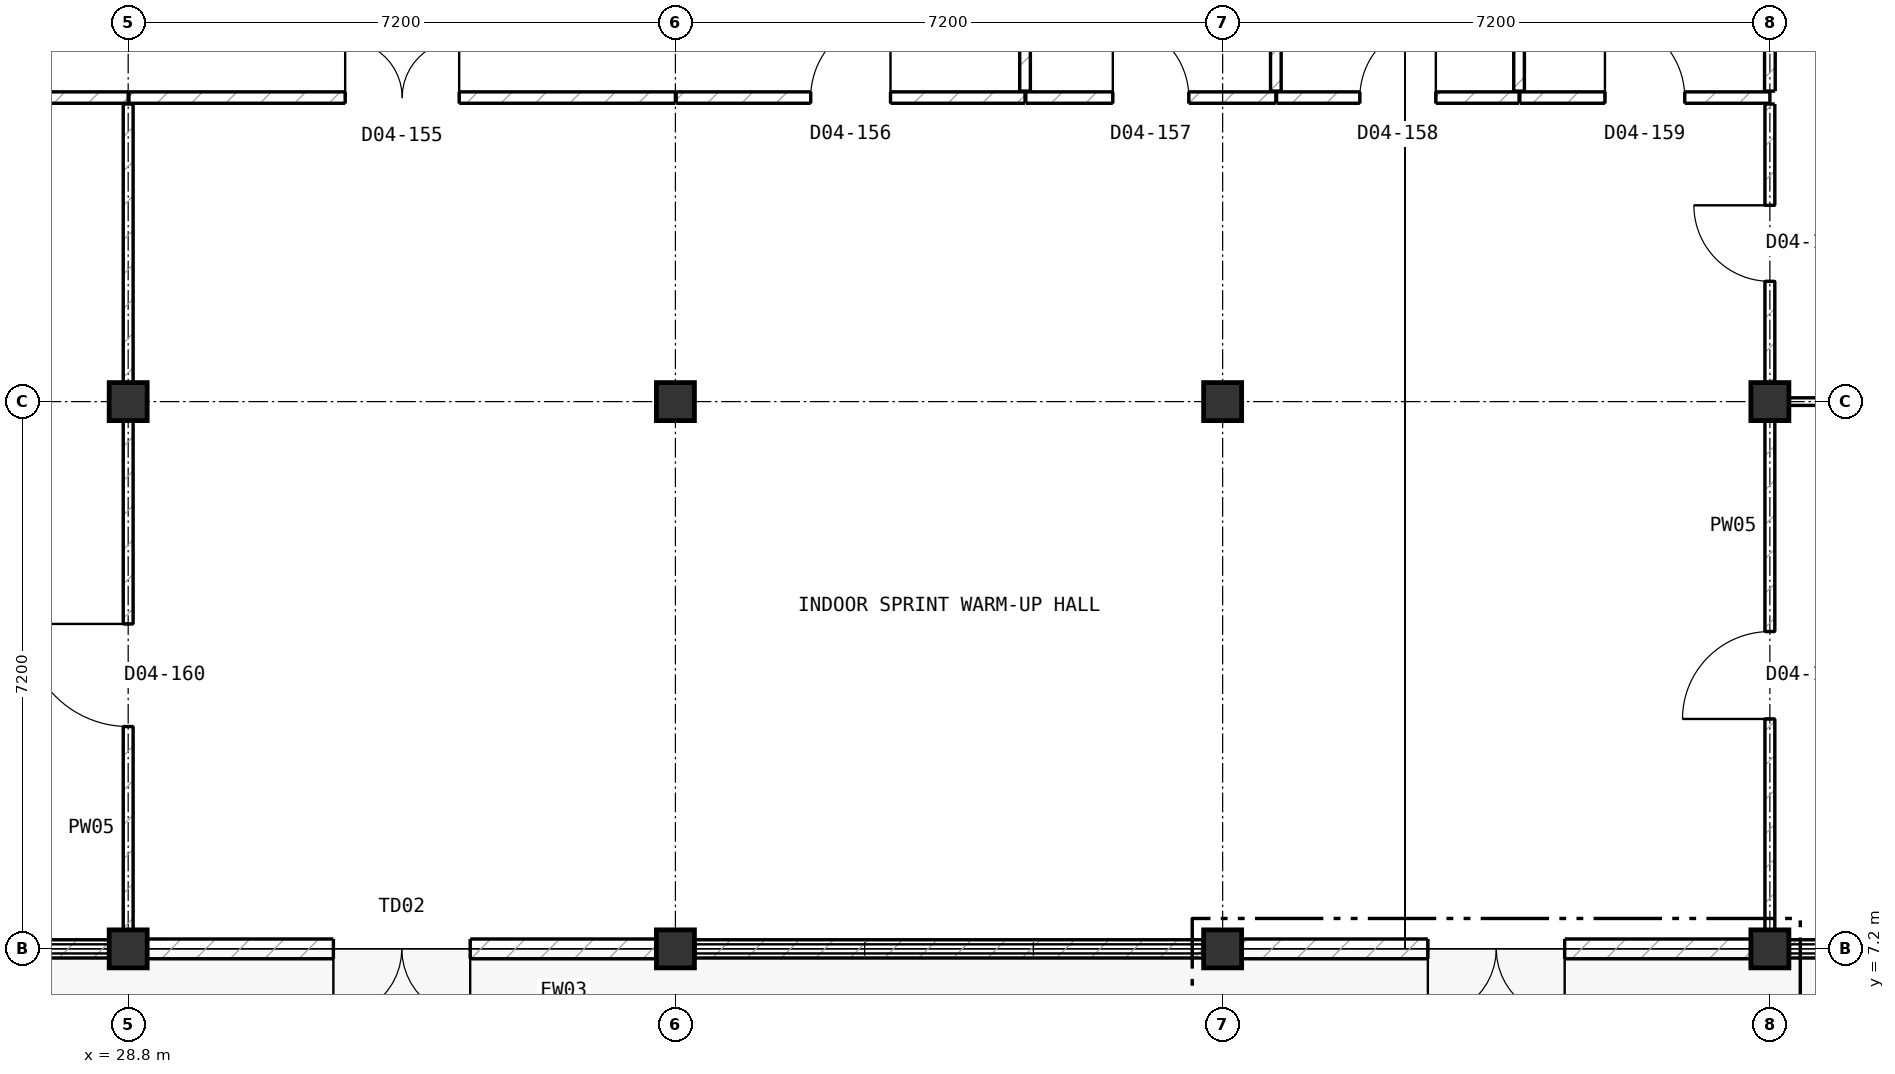
"""IFC4 building model, lengths in metres.
Left out: names, types, materials, properties, quantities, classifications, styles, units other than length and angle.
Written with IfcOpenShell. Run it as: python <this file> out.ifc"""

import sys

from ifc_helpers import new_model, si_unit, direction, frame, frame_2d, origin, origin_2d, place, context, subcontext, project, spatial, rectangle, extrude, element, fill, save


model = new_model("IFC4")
c1 = context("Model", 3, precision=1e-05, world=origin(), true_north=direction((0.0, 1.0)))
c2 = subcontext(c1, "Body", "Model", "MODEL_VIEW")
j1 = project(units=[si_unit("LENGTHUNIT", "METRE"), si_unit("PLANEANGLEUNIT", "RADIAN")], contexts=[c1])
p1 = place(None, origin())
s1 = spatial("IfcSite", under=j1, at=p1, CompositionType="ELEMENT")
p2 = place(p1, origin())
s2 = spatial("IfcBuilding", under=s1, at=p2, CompositionType="ELEMENT")
p3 = place(p2, frame((0.0, 0.0, 20.4)))
s3 = spatial("IfcBuildingStorey", under=s2, at=p3, CompositionType="ELEMENT", Elevation=20.4)
for number, where, z_axis, x_axis in (
    (1, (28.8, 7.2, 0.0), (0.0, 0.0, 1.0), (1.0, 0.0, 0.0)),
    (2, (28.8, 14.4, 0.0), (0.0, 0.0, 1.0), (1.0, 0.0, 0.0)),
    (3, (36.0, 7.2, 0.0), (0.0, 0.0, 1.0), (1.0, 0.0, 0.0)),
    (4, (36.0, 14.4, 0.0), (0.0, 0.0, 1.0), (1.0, 0.0, 0.0)),
    (5, (43.2, 7.2, 0.0), (0.0, 0.0, 1.0), (1.0, 0.0, 0.0)),
    (6, (43.2, 14.4, 0.0), (0.0, 0.0, 1.0), (1.0, 0.0, 0.0)),
    (7, (50.4, 7.2, 0.0), (0.0, 0.0, 1.0), (1.0, 0.0, 0.0)),
    (8, (50.4, 14.4, 0.0), (0.0, 0.0, 1.0), (1.0, 0.0, 0.0)),
):
    element("IfcColumn", number, at=place(p3, frame(where, z_axis=z_axis, x_axis=x_axis)), inside=s3, PredefinedType="COLUMN", context=c2, shape_type="SweptSolid", body=[
        extrude(rectangle(XDim=0.5, YDim=0.5, at=origin_2d()), origin(), (0.0, 0.0, 1.0), 4.4),
    ])
p4 = place(p3, frame((57.365, 7.2, 0.0), z_axis=(0.0, 0.0, 1.0), x_axis=(-1.0, 0.0, 0.0)))
e9 = element("IfcWall", 9, at=p4, inside=s3, PredefinedType="SOLIDWALL", context=c2, shape_type="SweptSolid", body=[
    extrude(rectangle(XDim=6.73, YDim=0.24, at=frame_2d((3.365, 0.0))), origin(), (0.0, 0.0, 1.0), 0.3),
])
p5 = place(p3, frame((50.165, 7.2, 0.0), z_axis=(0.0, 0.0, 1.0), x_axis=(-1.0, 0.0, 0.0)))
e10 = element("IfcWall", 10, at=p5, inside=s3, PredefinedType="SOLIDWALL", context=c2, shape_type="SweptSolid", body=[
    extrude(rectangle(XDim=6.73, YDim=0.26, at=frame_2d((3.365, 0.0))), origin(), (0.0, 0.0, 1.0), 3.655),
])
p6 = place(p5, frame((2.465, 0.0, 0.0)))
e11 = element("IfcOpeningElement", 11, at=p6, cuts=e10, PredefinedType="OPENING", context=c2, shape_type="SweptSolid", body=[
    extrude(rectangle(XDim=1.8, YDim=2.3, at=frame_2d((0.9, 1.15))), frame((0.0, 0.14, 0.0), z_axis=(0.0, -1.0, 0.0), x_axis=(1.0, 0.0, 0.0)), (0.0, 0.0, 1.0), 0.28),
])
p7 = place(p3, frame((42.965, 7.2, 0.0), z_axis=(0.0, 0.0, 1.0), x_axis=(-1.0, 0.0, 0.0)))
e12 = element("IfcWall", 12, at=p7, inside=s3, PredefinedType="SOLIDWALL", context=c2, shape_type="SweptSolid", body=[
    extrude(rectangle(XDim=6.73, YDim=0.24, at=frame_2d((3.365, 0.0))), origin(), (0.0, 0.0, 1.0), 0.3),
])
p8 = place(p3, frame((35.765, 7.2, 0.0), z_axis=(0.0, 0.0, 1.0), x_axis=(-1.0, 0.0, 0.0)))
e13 = element("IfcWall", 13, at=p8, inside=s3, PredefinedType="SOLIDWALL", context=c2, shape_type="SweptSolid", body=[
    extrude(rectangle(XDim=6.73, YDim=0.26, at=frame_2d((3.365, 0.0))), origin(), (0.0, 0.0, 1.0), 3.655),
])
p9 = place(p8, frame((2.465, 0.0, 0.0)))
e14 = element("IfcOpeningElement", 14, at=p9, cuts=e13, PredefinedType="OPENING", context=c2, shape_type="SweptSolid", body=[
    extrude(rectangle(XDim=1.8, YDim=2.3, at=frame_2d((0.9, 1.15))), frame((0.0, 0.14, 0.0), z_axis=(0.0, -1.0, 0.0), x_axis=(1.0, 0.0, 0.0)), (0.0, 0.0, 1.0), 0.28),
])
p10 = place(p3, frame((28.565, 7.2, 0.0), z_axis=(0.0, 0.0, 1.0), x_axis=(-1.0, 0.0, 0.0)))
e15 = element("IfcWall", 15, at=p10, inside=s3, PredefinedType="SOLIDWALL", context=c2, shape_type="SweptSolid", body=[
    extrude(rectangle(XDim=6.73, YDim=0.24, at=frame_2d((3.365, 0.0))), origin(), (0.0, 0.0, 1.0), 0.3),
])
p11 = place(p3, frame((21.61, 18.4, 0.0), z_axis=(0.0, 0.0, 1.0), x_axis=(1.0, 0.0, 0.0)))
e16 = element("IfcWall", 16, at=p11, inside=s3, PredefinedType="PARTITIONING", context=c2, shape_type="SweptSolid", body=[
    extrude(rectangle(XDim=7.19, YDim=0.15, at=frame_2d((3.595, 0.0))), origin(), (0.0, 0.0, 1.0), 4.12),
])
p12 = place(p3, frame((28.81, 18.4, 0.0), z_axis=(0.0, 0.0, 1.0), x_axis=(1.0, 0.0, 0.0)))
e17 = element("IfcWall", 17, at=p12, inside=s3, PredefinedType="PARTITIONING", context=c2, shape_type="SweptSolid", body=[
    extrude(rectangle(XDim=7.19, YDim=0.15, at=frame_2d((3.595, 0.0))), origin(), (0.0, 0.0, 1.0), 4.12),
])
p13 = place(p12, frame((2.845, 0.0, 0.0)))
e18 = element("IfcOpeningElement", 18, at=p13, cuts=e17, PredefinedType="OPENING", context=c2, shape_type="SweptSolid", body=[
    extrude(rectangle(XDim=1.5, YDim=2.2, at=frame_2d((0.75, 1.1))), frame((0.0, 0.085, 0.0), z_axis=(0.0, -1.0, 0.0), x_axis=(1.0, 0.0, 0.0)), (0.0, 0.0, 1.0), 0.17),
])
p14 = place(p3, frame((36.01, 18.4, 0.0), z_axis=(0.0, 0.0, 1.0), x_axis=(1.0, 0.0, 0.0)))
e19 = element("IfcWall", 19, at=p14, inside=s3, PredefinedType="PARTITIONING", context=c2, shape_type="SweptSolid", body=[
    extrude(rectangle(XDim=4.59, YDim=0.15, at=frame_2d((2.295, 0.0))), origin(), (0.0, 0.0, 1.0), 4.12),
])
p15 = place(p14, frame((1.77, 0.0, 0.0)))
e20 = element("IfcOpeningElement", 20, at=p15, cuts=e19, PredefinedType="OPENING", context=c2, shape_type="SweptSolid", body=[
    extrude(rectangle(XDim=1.05, YDim=2.15, at=frame_2d((0.525, 1.075))), frame((0.0, 0.085, 0.0), z_axis=(0.0, -1.0, 0.0), x_axis=(1.0, 0.0, 0.0)), (0.0, 0.0, 1.0), 0.17),
])
p16 = place(p3, frame((40.61, 18.4, 0.0), z_axis=(0.0, 0.0, 1.0), x_axis=(1.0, 0.0, 0.0)))
e21 = element("IfcWall", 21, at=p16, inside=s3, PredefinedType="PARTITIONING", context=c2, shape_type="SweptSolid", body=[
    extrude(rectangle(XDim=3.29, YDim=0.15, at=frame_2d((1.645, 0.0))), origin(), (0.0, 0.0, 1.0), 4.12),
])
p17 = place(p16, frame((1.145, 0.0, 0.0)))
e22 = element("IfcOpeningElement", 22, at=p17, cuts=e21, PredefinedType="OPENING", context=c2, shape_type="SweptSolid", body=[
    extrude(rectangle(XDim=1.0, YDim=2.15, at=frame_2d((0.5, 1.075))), frame((0.0, 0.085, 0.0), z_axis=(0.0, -1.0, 0.0), x_axis=(1.0, 0.0, 0.0)), (0.0, 0.0, 1.0), 0.17),
])
p18 = place(p3, frame((43.91, 18.4, 0.0), z_axis=(0.0, 0.0, 1.0), x_axis=(1.0, 0.0, 0.0)))
e23 = element("IfcWall", 23, at=p18, inside=s3, PredefinedType="PARTITIONING", context=c2, shape_type="SweptSolid", body=[
    extrude(rectangle(XDim=3.19, YDim=0.15, at=frame_2d((1.595, 0.0))), origin(), (0.0, 0.0, 1.0), 4.12),
])
p19 = place(p18, frame((1.095, 0.0, 0.0)))
e24 = element("IfcOpeningElement", 24, at=p19, cuts=e23, PredefinedType="OPENING", context=c2, shape_type="SweptSolid", body=[
    extrude(rectangle(XDim=1.0, YDim=2.15, at=frame_2d((0.5, 1.075))), frame((0.0, 0.085, 0.0), z_axis=(0.0, -1.0, 0.0), x_axis=(1.0, 0.0, 0.0)), (0.0, 0.0, 1.0), 0.17),
])
p20 = place(p3, frame((47.11, 18.4, 0.0), z_axis=(0.0, 0.0, 1.0), x_axis=(1.0, 0.0, 0.0)))
e25 = element("IfcWall", 25, at=p20, inside=s3, PredefinedType="PARTITIONING", context=c2, shape_type="SweptSolid", body=[
    extrude(rectangle(XDim=3.29, YDim=0.15, at=frame_2d((1.645, 0.0))), origin(), (0.0, 0.0, 1.0), 4.12),
])
p21 = place(p20, frame((1.12, 0.0, 0.0)))
e26 = element("IfcOpeningElement", 26, at=p21, cuts=e25, PredefinedType="OPENING", context=c2, shape_type="SweptSolid", body=[
    extrude(rectangle(XDim=1.05, YDim=2.15, at=frame_2d((0.525, 1.075))), frame((0.0, 0.085, 0.0), z_axis=(0.0, -1.0, 0.0), x_axis=(1.0, 0.0, 0.0)), (0.0, 0.0, 1.0), 0.17),
])
p22 = place(p3, frame((40.6, 18.485, 0.0), z_axis=(0.0, 0.0, 1.0), x_axis=(0.0, 1.0, 0.0)))
e27 = element("IfcWall", 27, at=p22, inside=s3, PredefinedType="PARTITIONING", context=c2, shape_type="SweptSolid", body=[
    extrude(rectangle(XDim=2.975, YDim=0.14, at=frame_2d((1.487, 0.0))), origin(), (0.0, 0.0, 1.0), 4.12),
])
p23 = place(p3, frame((43.9, 18.485, 0.0), z_axis=(0.0, 0.0, 1.0), x_axis=(0.0, 1.0, 0.0)))
e28 = element("IfcWall", 28, at=p23, inside=s3, PredefinedType="PARTITIONING", context=c2, shape_type="SweptSolid", body=[
    extrude(rectangle(XDim=2.915, YDim=0.14, at=frame_2d((1.458, 0.0))), origin(), (0.0, 0.0, 1.0), 4.12),
])
p24 = place(p3, frame((47.1, 18.485, 0.0), z_axis=(0.0, 0.0, 1.0), x_axis=(0.0, 1.0, 0.0)))
e29 = element("IfcWall", 29, at=p24, inside=s3, PredefinedType="PARTITIONING", context=c2, shape_type="SweptSolid", body=[
    extrude(rectangle(XDim=2.975, YDim=0.14, at=frame_2d((1.487, 0.0))), origin(), (0.0, 0.0, 1.0), 4.12),
])
p25 = place(p3, frame((50.4, 18.485, 0.0), z_axis=(0.0, 0.0, 1.0), x_axis=(0.0, 1.0, 0.0)))
e30 = element("IfcWall", 30, at=p25, inside=s3, PredefinedType="PARTITIONING", context=c2, shape_type="SweptSolid", body=[
    extrude(rectangle(XDim=2.865, YDim=0.14, at=frame_2d((1.433, 0.0))), origin(), (0.0, 0.0, 1.0), 3.65),
])
p26 = place(p3, frame((28.8, 7.45, 0.0), z_axis=(0.0, 0.0, 1.0), x_axis=(0.0, 1.0, 0.0)))
e31 = element("IfcWall", 31, at=p26, inside=s3, PredefinedType="PARTITIONING", context=c2, shape_type="SweptSolid", body=[
    extrude(rectangle(XDim=6.7, YDim=0.13, at=frame_2d((3.35, 0.0))), origin(), (0.0, 0.0, 1.0), 3.65),
])
p27 = place(p26, frame((2.675, 0.0, 0.0)))
e32 = element("IfcOpeningElement", 32, at=p27, cuts=e31, PredefinedType="OPENING", context=c2, shape_type="SweptSolid", body=[
    extrude(rectangle(XDim=1.35, YDim=2.15, at=frame_2d((0.675, 1.075))), frame((0.0, 0.075, 0.0), z_axis=(0.0, -1.0, 0.0), x_axis=(1.0, 0.0, 0.0)), (0.0, 0.0, 1.0), 0.15),
])
p28 = place(p3, frame((28.8, 14.65, 0.0), z_axis=(0.0, 0.0, 1.0), x_axis=(0.0, 1.0, 0.0)))
e33 = element("IfcWall", 33, at=p28, inside=s3, PredefinedType="PARTITIONING", context=c2, shape_type="SweptSolid", body=[
    extrude(rectangle(XDim=3.665, YDim=0.13, at=frame_2d((1.833, 0.0))), origin(), (0.0, 0.0, 1.0), 3.65),
])
p29 = place(p3, frame((50.4, 7.45, 0.0), z_axis=(0.0, 0.0, 1.0), x_axis=(0.0, 1.0, 0.0)))
e34 = element("IfcWall", 34, at=p29, inside=s3, PredefinedType="PARTITIONING", context=c2, shape_type="SweptSolid", body=[
    extrude(rectangle(XDim=6.7, YDim=0.13, at=frame_2d((3.35, 0.0))), origin(), (0.0, 0.0, 1.0), 3.65),
])
p30 = place(p29, frame((2.775, 0.0, 0.0)))
e35 = element("IfcOpeningElement", 35, at=p30, cuts=e34, PredefinedType="OPENING", context=c2, shape_type="SweptSolid", body=[
    extrude(rectangle(XDim=1.15, YDim=2.15, at=frame_2d((0.575, 1.075))), frame((0.0, 0.075, 0.0), z_axis=(0.0, -1.0, 0.0), x_axis=(1.0, 0.0, 0.0)), (0.0, 0.0, 1.0), 0.15),
])
p31 = place(p3, frame((50.4, 14.65, 0.0), z_axis=(0.0, 0.0, 1.0), x_axis=(0.0, 1.0, 0.0)))
e36 = element("IfcWall", 36, at=p31, inside=s3, PredefinedType="PARTITIONING", context=c2, shape_type="SweptSolid", body=[
    extrude(rectangle(XDim=3.665, YDim=0.13, at=frame_2d((1.833, 0.0))), origin(), (0.0, 0.0, 1.0), 3.65),
])
p32 = place(p31, frame((1.333, 0.0, 0.0)))
e37 = element("IfcOpeningElement", 37, at=p32, cuts=e36, PredefinedType="OPENING", context=c2, shape_type="SweptSolid", body=[
    extrude(rectangle(XDim=1.0, YDim=2.1, at=frame_2d((0.5, 1.05))), frame((0.0, 0.075, 0.0), z_axis=(0.0, -1.0, 0.0), x_axis=(1.0, 0.0, 0.0)), (0.0, 0.0, 1.0), 0.15),
])
p33 = place(p3, frame((50.65, 14.4, 0.0), z_axis=(0.0, 0.0, 1.0), x_axis=(1.0, 0.0, 0.0)))
e38 = element("IfcWall", 38, at=p33, inside=s3, PredefinedType="PARTITIONING", context=c2, shape_type="SweptSolid", body=[
    extrude(rectangle(XDim=6.7, YDim=0.1, at=frame_2d((3.35, 0.0))), origin(), (0.0, 0.0, 1.0), 3.6),
])
p34 = place(p33, frame((2.875, 0.0, 0.0)))
e39 = element("IfcOpeningElement", 39, at=p34, cuts=e38, PredefinedType="OPENING", context=c2, shape_type="SweptSolid", body=[
    extrude(rectangle(XDim=0.95, YDim=2.1, at=frame_2d((0.475, 1.05))), frame((0.0, 0.06, 0.0), z_axis=(0.0, -1.0, 0.0), x_axis=(1.0, 0.0, 0.0)), (0.0, 0.0, 1.0), 0.12),
])
p35 = place(p6, origin())
e40 = element("IfcDoor", 40, at=p35, inside=s3, OperationType="DOUBLE_DOOR_SINGLE_SWING", PredefinedType="DOOR", context=c2, shape_type="SweptSolid", body=[
    extrude(rectangle(XDim=1.8, YDim=2.3, at=frame_2d((0.9, 1.15))), frame((0.0, 0.025, 0.0), z_axis=(0.0, -1.0, 0.0), x_axis=(1.0, 0.0, 0.0)), (0.0, 0.0, 1.0), 0.05),
])
fill(e11, e40)
p36 = place(p9, origin())
e41 = element("IfcDoor", 41, at=p36, inside=s3, OperationType="DOUBLE_DOOR_SINGLE_SWING", PredefinedType="DOOR", context=c2, shape_type="SweptSolid", body=[
    extrude(rectangle(XDim=1.8, YDim=2.3, at=frame_2d((0.9, 1.15))), frame((0.0, 0.025, 0.0), z_axis=(0.0, -1.0, 0.0), x_axis=(1.0, 0.0, 0.0)), (0.0, 0.0, 1.0), 0.05),
])
fill(e14, e41)
p37 = place(p13, origin())
e42 = element("IfcDoor", 42, at=p37, inside=s3, OperationType="DOUBLE_DOOR_SINGLE_SWING", PredefinedType="DOOR", context=c2, shape_type="SweptSolid", body=[
    extrude(rectangle(XDim=1.5, YDim=2.2, at=frame_2d((0.75, 1.1))), frame((0.0, 0.025, 0.0), z_axis=(0.0, -1.0, 0.0), x_axis=(1.0, 0.0, 0.0)), (0.0, 0.0, 1.0), 0.05),
])
fill(e18, e42)
p38 = place(p15, origin())
e43 = element("IfcDoor", 43, at=p38, inside=s3, OperationType="SINGLE_SWING_RIGHT", PredefinedType="DOOR", context=c2, shape_type="SweptSolid", body=[
    extrude(rectangle(XDim=1.05, YDim=2.15, at=frame_2d((0.525, 1.075))), frame((0.0, 0.025, 0.0), z_axis=(0.0, -1.0, 0.0), x_axis=(1.0, 0.0, 0.0)), (0.0, 0.0, 1.0), 0.05),
])
fill(e20, e43)
p39 = place(p17, origin())
e44 = element("IfcDoor", 44, at=p39, inside=s3, OperationType="SINGLE_SWING_LEFT", PredefinedType="DOOR", context=c2, shape_type="SweptSolid", body=[
    extrude(rectangle(XDim=1.0, YDim=2.15, at=frame_2d((0.5, 1.075))), frame((0.0, 0.025, 0.0), z_axis=(0.0, -1.0, 0.0), x_axis=(1.0, 0.0, 0.0)), (0.0, 0.0, 1.0), 0.05),
])
fill(e22, e44)
p40 = place(p19, origin())
e45 = element("IfcDoor", 45, at=p40, inside=s3, OperationType="SINGLE_SWING_RIGHT", PredefinedType="DOOR", context=c2, shape_type="SweptSolid", body=[
    extrude(rectangle(XDim=1.0, YDim=2.15, at=frame_2d((0.5, 1.075))), frame((0.0, 0.025, 0.0), z_axis=(0.0, -1.0, 0.0), x_axis=(1.0, 0.0, 0.0)), (0.0, 0.0, 1.0), 0.05),
])
fill(e24, e45)
p41 = place(p21, origin())
e46 = element("IfcDoor", 46, at=p41, inside=s3, OperationType="SINGLE_SWING_LEFT", PredefinedType="DOOR", context=c2, shape_type="SweptSolid", body=[
    extrude(rectangle(XDim=1.05, YDim=2.15, at=frame_2d((0.525, 1.075))), frame((0.0, 0.025, 0.0), z_axis=(0.0, -1.0, 0.0), x_axis=(1.0, 0.0, 0.0)), (0.0, 0.0, 1.0), 0.05),
])
fill(e26, e46)
p42 = place(p27, origin())
e47 = element("IfcDoor", 47, at=p42, inside=s3, OperationType="SINGLE_SWING_RIGHT", PredefinedType="DOOR", context=c2, shape_type="SweptSolid", body=[
    extrude(rectangle(XDim=1.35, YDim=2.15, at=frame_2d((0.675, 1.075))), frame((0.0, 0.025, 0.0), z_axis=(0.0, -1.0, 0.0), x_axis=(1.0, 0.0, 0.0)), (0.0, 0.0, 1.0), 0.05),
])
fill(e32, e47)
p43 = place(p30, origin())
e48 = element("IfcDoor", 48, at=p43, inside=s3, OperationType="SINGLE_SWING_LEFT", PredefinedType="DOOR", context=c2, shape_type="SweptSolid", body=[
    extrude(rectangle(XDim=1.15, YDim=2.15, at=frame_2d((0.575, 1.075))), frame((0.0, 0.025, 0.0), z_axis=(0.0, -1.0, 0.0), x_axis=(1.0, 0.0, 0.0)), (0.0, 0.0, 1.0), 0.05),
])
fill(e35, e48)
p44 = place(p32, origin())
e49 = element("IfcDoor", 49, at=p44, inside=s3, OperationType="SINGLE_SWING_RIGHT", PredefinedType="DOOR", context=c2, shape_type="SweptSolid", body=[
    extrude(rectangle(XDim=1.0, YDim=2.1, at=frame_2d((0.5, 1.05))), frame((0.0, 0.025, 0.0), z_axis=(0.0, -1.0, 0.0), x_axis=(1.0, 0.0, 0.0)), (0.0, 0.0, 1.0), 0.05),
])
fill(e37, e49)
save(model, sys.argv[1])
